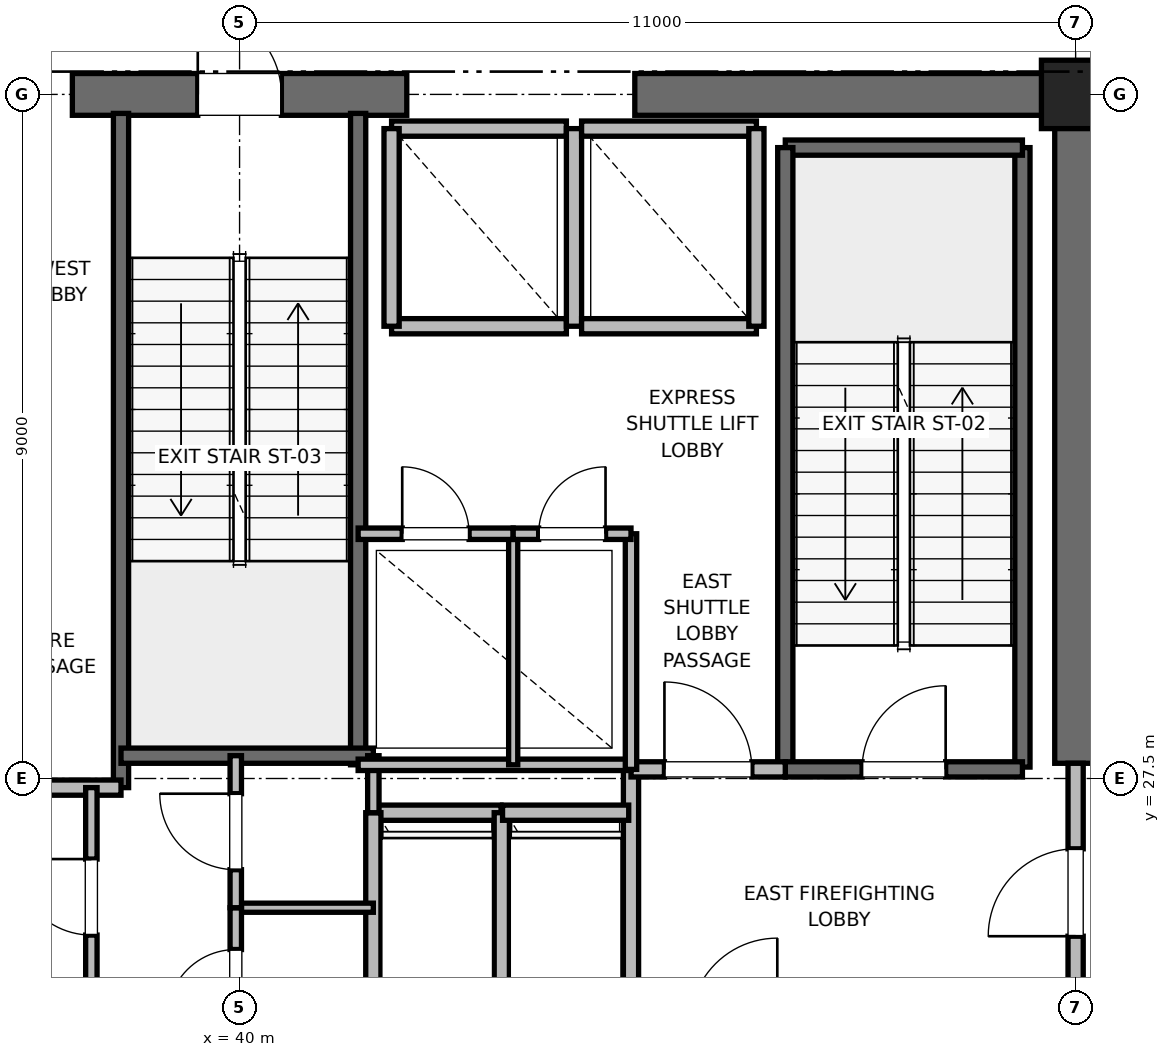
"""IFC4 building model, lengths in metres.
Left out: names, types, materials, properties, quantities, classifications, styles, units other than length and angle.
Written with IfcOpenShell. Run it as: python <this file> out.ifc"""

import sys

from ifc_helpers import new_model, si_unit, direction, frame, frame_2d, origin, origin_2d, place, context, subcontext, project, spatial, rectangle, extrude, element, fill, save


model = new_model("IFC4")
c1 = context("Model", 3, precision=1e-05, world=origin(), true_north=direction((0.0, 1.0)))
c2 = subcontext(c1, "Body", "Model", "MODEL_VIEW")
j1 = project(units=[si_unit("LENGTHUNIT", "METRE"), si_unit("PLANEANGLEUNIT", "RADIAN")], contexts=[c1])
p1 = place(None, origin())
s1 = spatial("IfcSite", under=j1, at=p1, CompositionType="ELEMENT")
p2 = place(p1, origin())
s2 = spatial("IfcBuilding", under=s1, at=p2, CompositionType="ELEMENT")
p3 = place(p2, frame((0.0, 0.0, 184.4)))
s3 = spatial("IfcBuildingStorey", under=s2, at=p3, CompositionType="ELEMENT", Elevation=184.4)
p4 = place(p3, frame((51.0, 36.5, 0.0), z_axis=(0.0, 0.0, 1.0), x_axis=(1.0, 0.0, 0.0)))
e1 = element("IfcColumn", 1, at=p4, inside=s3, PredefinedType="PILASTER", context=c2, shape_type="SweptSolid", body=[
    extrude(rectangle(XDim=0.9, YDim=0.9, at=origin_2d()), origin(), (0.0, 0.0, 1.0), 5.0),
])
p5 = place(p3, frame((37.8, 36.5, 0.0), z_axis=(0.0, 0.0, 1.0), x_axis=(1.0, 0.0, 0.0)))
e2 = element("IfcWall", 2, at=p5, inside=s3, PredefinedType="SHEAR", context=c2, shape_type="SweptSolid", body=[
    extrude(rectangle(XDim=4.4, YDim=0.55, at=frame_2d((2.2, 0.0))), origin(), (0.0, 0.0, 1.0), 4.7),
])
p6 = place(p5, frame((1.65, 0.0, 0.0)))
e3 = element("IfcOpeningElement", 3, at=p6, cuts=e2, PredefinedType="OPENING", context=c2, shape_type="SweptSolid", body=[
    extrude(rectangle(XDim=1.1, YDim=2.15, at=frame_2d((0.55, 1.075))), frame((0.0, 0.275, 0.0), z_axis=(0.0, -1.0, 0.0), x_axis=(1.0, 0.0, 0.0)), (0.0, 0.0, 1.0), 0.55),
])
p7 = place(p3, frame((45.2, 36.5, 0.0), z_axis=(0.0, 0.0, 1.0), x_axis=(1.0, 0.0, 0.0)))
e4 = element("IfcWall", 4, at=p7, inside=s3, PredefinedType="SHEAR", context=c2, shape_type="SweptSolid", body=[
    extrude(rectangle(XDim=5.8, YDim=0.55, at=frame_2d((2.9, 0.0))), origin(), (0.0, 0.0, 1.0), 4.7),
])
p8 = place(p3, frame((51.0, 27.7, 0.0), z_axis=(0.0, 0.0, 1.0), x_axis=(0.0, 1.0, 0.0)))
e5 = element("IfcWall", 5, at=p8, inside=s3, PredefinedType="SHEAR", context=c2, shape_type="SweptSolid", body=[
    extrude(rectangle(XDim=8.8, YDim=0.55, at=frame_2d((4.4, 0.0))), origin(), (0.0, 0.0, 1.0), 4.7),
])
p9 = place(p3, frame((50.3, 27.65, 0.0), z_axis=(0.0, 0.0, 1.0), x_axis=(0.0, 1.0, 0.0)))
e6 = element("IfcWall", 6, at=p9, inside=s3, PredefinedType="SOLIDWALL", context=c2, shape_type="SweptSolid", body=[
    extrude(rectangle(XDim=8.15, YDim=0.2, at=frame_2d((4.075, 0.0))), origin(), (0.0, 0.0, 1.0), 4.7),
])
p10 = place(p3, frame((47.18, 35.8, 0.0), z_axis=(0.0, 0.0, 1.0), x_axis=(1.0, 0.0, 0.0)))
e7 = element("IfcWall", 7, at=p10, inside=s3, PredefinedType="SOLIDWALL", context=c2, shape_type="SweptSolid", body=[
    extrude(rectangle(XDim=3.12, YDim=0.2, at=frame_2d((1.56, 0.0))), origin(), (0.0, 0.0, 1.0), 4.7),
])
p11 = place(p3, frame((47.18, 27.62, 0.0), z_axis=(0.0, 0.0, 1.0), x_axis=(0.0, 1.0, 0.0)))
e8 = element("IfcWall", 8, at=p11, inside=s3, PredefinedType="SOLIDWALL", context=c2, shape_type="SweptSolid", body=[
    extrude(rectangle(XDim=8.18, YDim=0.2, at=frame_2d((4.09, 0.0))), origin(), (0.0, 0.0, 1.0), 4.7),
])
p12 = place(p3, frame((47.18, 27.62, 0.0), z_axis=(0.0, 0.0, 1.0), x_axis=(1.0, 0.0, 0.0)))
e9 = element("IfcWall", 9, at=p12, inside=s3, PredefinedType="SOLIDWALL", context=c2, shape_type="SweptSolid", body=[
    extrude(rectangle(XDim=3.12, YDim=0.2, at=frame_2d((1.56, 0.0))), origin(), (0.0, 0.0, 1.0), 4.7),
])
p13 = place(p12, frame((1.01, 0.0, 0.0)))
e10 = element("IfcOpeningElement", 10, at=p13, cuts=e9, PredefinedType="OPENING", context=c2, shape_type="SweptSolid", body=[
    extrude(rectangle(XDim=1.1, YDim=2.15, at=frame_2d((0.55, 1.075))), frame((0.0, 0.1, 0.0), z_axis=(0.0, -1.0, 0.0), x_axis=(1.0, 0.0, 0.0)), (0.0, 0.0, 1.0), 0.2),
])
p14 = place(p3, frame((38.44, 27.38, 0.0), z_axis=(0.0, 0.0, 1.0), x_axis=(0.0, 1.0, 0.0)))
e11 = element("IfcWall", 11, at=p14, inside=s3, PredefinedType="SOLIDWALL", context=c2, shape_type="SweptSolid", body=[
    extrude(rectangle(XDim=8.87, YDim=0.2, at=frame_2d((4.435, 0.0))), origin(), (0.0, 0.0, 1.0), 4.7),
])
p15 = place(p3, frame((41.56, 27.68, 0.0), z_axis=(0.0, 0.0, 1.0), x_axis=(0.0, 1.0, 0.0)))
e12 = element("IfcWall", 12, at=p15, inside=s3, PredefinedType="SOLIDWALL", context=c2, shape_type="SweptSolid", body=[
    extrude(rectangle(XDim=8.57, YDim=0.2, at=frame_2d((4.285, 0.0))), origin(), (0.0, 0.0, 1.0), 4.7),
])
p16 = place(p3, frame((38.44, 27.8, 0.0), z_axis=(0.0, 0.0, 1.0), x_axis=(1.0, 0.0, 0.0)))
e13 = element("IfcWall", 13, at=p16, inside=s3, PredefinedType="SOLIDWALL", context=c2, shape_type="SweptSolid", body=[
    extrude(rectangle(XDim=3.32, YDim=0.2, at=frame_2d((1.66, 0.0))), origin(), (0.0, 0.0, 1.0), 4.7),
])
p17 = place(p3, frame((32.82, 27.38, 0.0), z_axis=(0.0, 0.0, 1.0), x_axis=(1.0, 0.0, 0.0)))
e14 = element("IfcWall", 14, at=p17, inside=s3, PredefinedType="PARTITIONING", context=c2, shape_type="SweptSolid", body=[
    extrude(rectangle(XDim=5.62, YDim=0.2, at=frame_2d((2.81, 0.0))), origin(), (0.0, 0.0, 1.0), 4.7),
])
p18 = place(p3, frame((45.15, 24.25, 0.0), z_axis=(0.0, 0.0, 1.0), x_axis=(0.0, 1.0, 0.0)))
e15 = element("IfcWall", 15, at=p18, inside=s3, PredefinedType="PARTITIONING", context=c2, shape_type="SweptSolid", body=[
    extrude(rectangle(XDim=3.37, YDim=0.2, at=frame_2d((1.685, 0.0))), origin(), (0.0, 0.0, 1.0), 4.7),
])
p19 = place(p3, frame((45.15, 27.62, 0.0), z_axis=(0.0, 0.0, 1.0), x_axis=(1.0, 0.0, 0.0)))
e16 = element("IfcWall", 16, at=p19, inside=s3, PredefinedType="PARTITIONING", context=c2, shape_type="SweptSolid", body=[
    extrude(rectangle(XDim=2.03, YDim=0.2, at=frame_2d((1.015, 0.0))), origin(), (0.0, 0.0, 1.0), 4.7),
])
p20 = place(p19, frame((0.44, 0.0, 0.0)))
e17 = element("IfcOpeningElement", 17, at=p20, cuts=e16, PredefinedType="OPENING", context=c2, shape_type="SweptSolid", body=[
    extrude(rectangle(XDim=1.15, YDim=2.2, at=frame_2d((0.575, 1.1))), frame((0.0, 0.1, 0.0), z_axis=(0.0, -1.0, 0.0), x_axis=(1.0, 0.0, 0.0)), (0.0, 0.0, 1.0), 0.2),
])
p21 = place(p3, frame((51.0, 24.3, 0.0), z_axis=(0.0, 0.0, 1.0), x_axis=(0.0, 1.0, 0.0)))
e18 = element("IfcWall", 18, at=p21, inside=s3, PredefinedType="PARTITIONING", context=c2, shape_type="SweptSolid", body=[
    extrude(rectangle(XDim=3.4, YDim=0.2, at=frame_2d((1.7, 0.0))), origin(), (0.0, 0.0, 1.0), 3.68),
])
p22 = place(p21, frame((1.125, 0.0, 0.0)))
e19 = element("IfcOpeningElement", 19, at=p22, cuts=e18, PredefinedType="OPENING", context=c2, shape_type="SweptSolid", body=[
    extrude(rectangle(XDim=1.15, YDim=2.2, at=frame_2d((0.575, 1.1))), frame((0.0, 0.1, 0.0), z_axis=(0.0, -1.0, 0.0), x_axis=(1.0, 0.0, 0.0)), (0.0, 0.0, 1.0), 0.2),
])
p23 = place(p3, frame((43.44, 27.05, 0.0), z_axis=(0.0, 0.0, 1.0), x_axis=(-1.0, 0.0, 0.0)))
e20 = element("IfcWall", 20, at=p23, inside=s3, PredefinedType="SOLIDWALL", context=c2, shape_type="SweptSolid", body=[
    extrude(rectangle(XDim=1.68, YDim=0.2, at=frame_2d((0.84, 0.0))), origin(), (0.0, 0.0, 1.0), 4.7),
])
for number, where, z_axis, x_axis in (
    (21, (41.76, 27.05, 0.0), (0.0, 0.0, 1.0), (0.0, -1.0, 0.0)),
    (22, (43.45, 24.45, 0.0), (0.0, 0.0, 1.0), (0.0, 1.0, 0.0)),
):
    element("IfcWall", number, at=place(p3, frame(where, z_axis=z_axis, x_axis=x_axis)), inside=s3, PredefinedType="SOLIDWALL", context=c2, shape_type="SweptSolid", body=[
        extrude(rectangle(XDim=2.6, YDim=0.2, at=frame_2d((1.3, 0.0))), origin(), (0.0, 0.0, 1.0), 4.7),
    ])
p24 = place(p3, frame((45.12, 27.05, 0.0), z_axis=(0.0, 0.0, 1.0), x_axis=(-1.0, 0.0, 0.0)))
e23 = element("IfcWall", 23, at=p24, inside=s3, PredefinedType="SOLIDWALL", context=c2, shape_type="SweptSolid", body=[
    extrude(rectangle(XDim=1.66, YDim=0.2, at=frame_2d((0.83, 0.0))), origin(), (0.0, 0.0, 1.0), 4.7),
])
p25 = place(p3, frame((42.0, 33.45, 0.0), z_axis=(0.0, 0.0, 1.0), x_axis=(1.0, 0.0, 0.0)))
e24 = element("IfcWall", 24, at=p25, inside=s3, PredefinedType="SOLIDWALL", context=c2, shape_type="SweptSolid", body=[
    extrude(rectangle(XDim=2.3, YDim=0.2, at=frame_2d((1.15, 0.0))), origin(), (0.0, 0.0, 1.0), 4.7),
])
p26 = place(p3, frame((44.3, 36.05, 0.0), z_axis=(0.0, 0.0, 1.0), x_axis=(-1.0, 0.0, 0.0)))
e25 = element("IfcWall", 25, at=p26, inside=s3, PredefinedType="SOLIDWALL", context=c2, shape_type="SweptSolid", body=[
    extrude(rectangle(XDim=2.3, YDim=0.2, at=frame_2d((1.15, 0.0))), origin(), (0.0, 0.0, 1.0), 3.68),
])
for number, where, z_axis, x_axis in (
    (26, (42.0, 36.05, 0.0), (0.0, 0.0, 1.0), (0.0, -1.0, 0.0)),
    (27, (44.4, 33.45, 0.0), (0.0, 0.0, 1.0), (0.0, 1.0, 0.0)),
):
    element("IfcWall", number, at=place(p3, frame(where, z_axis=z_axis, x_axis=x_axis)), inside=s3, PredefinedType="SOLIDWALL", context=c2, shape_type="SweptSolid", body=[
        extrude(rectangle(XDim=2.6, YDim=0.2, at=frame_2d((1.3, 0.0))), origin(), (0.0, 0.0, 1.0), 3.68),
    ])
p27 = place(p3, frame((44.5, 33.45, 0.0), z_axis=(0.0, 0.0, 1.0), x_axis=(1.0, 0.0, 0.0)))
e28 = element("IfcWall", 28, at=p27, inside=s3, PredefinedType="SOLIDWALL", context=c2, shape_type="SweptSolid", body=[
    extrude(rectangle(XDim=2.3, YDim=0.2, at=frame_2d((1.15, 0.0))), origin(), (0.0, 0.0, 1.0), 4.7),
])
p28 = place(p3, frame((46.8, 36.05, 0.0), z_axis=(0.0, 0.0, 1.0), x_axis=(-1.0, 0.0, 0.0)))
e29 = element("IfcWall", 29, at=p28, inside=s3, PredefinedType="SOLIDWALL", context=c2, shape_type="SweptSolid", body=[
    extrude(rectangle(XDim=2.3, YDim=0.2, at=frame_2d((1.15, 0.0))), origin(), (0.0, 0.0, 1.0), 3.68),
])
p29 = place(p3, frame((46.8, 33.45, 0.0), z_axis=(0.0, 0.0, 1.0), x_axis=(0.0, 1.0, 0.0)))
e30 = element("IfcWall", 30, at=p29, inside=s3, PredefinedType="SOLIDWALL", context=c2, shape_type="SweptSolid", body=[
    extrude(rectangle(XDim=2.6, YDim=0.2, at=frame_2d((1.3, 0.0))), origin(), (0.0, 0.0, 1.0), 4.7),
])
p30 = place(p3, frame((39.95, 25.8, 0.0), z_axis=(0.0, 0.0, 1.0), x_axis=(1.0, 0.0, 0.0)))
e31 = element("IfcWall", 31, at=p30, inside=s3, PredefinedType="PARTITIONING", context=c2, shape_type="SweptSolid", body=[
    extrude(rectangle(XDim=1.81, YDim=0.12, at=frame_2d((0.905, 0.0))), origin(), (0.0, 0.0, 1.0), 2.85),
])
p31 = place(p3, frame((41.76, 27.05, 0.0), z_axis=(0.0, 0.0, 1.0), x_axis=(0.0, 1.0, 0.0)))
e32 = element("IfcWall", 32, at=p31, inside=s3, PredefinedType="PARTITIONING", context=c2, shape_type="SweptSolid", body=[
    extrude(rectangle(XDim=0.75, YDim=0.15, at=frame_2d((0.375, 0.0))), origin(), (0.0, 0.0, 1.0), 2.85),
])
p32 = place(p3, frame((39.95, 23.8, 0.0), z_axis=(0.0, 0.0, 1.0), x_axis=(0.0, 1.0, 0.0)))
e33 = element("IfcWall", 33, at=p32, inside=s3, PredefinedType="PARTITIONING", context=c2, shape_type="SweptSolid", body=[
    extrude(rectangle(XDim=2.0, YDim=0.15, at=frame_2d((1.0, 0.0))), origin(), (0.0, 0.0, 1.0), 2.85),
])
p33 = place(p32, frame((0.55, 0.0, 0.0)))
e34 = element("IfcOpeningElement", 34, at=p33, cuts=e33, PredefinedType="OPENING", context=c2, shape_type="SweptSolid", body=[
    extrude(rectangle(XDim=0.9, YDim=2.1, at=frame_2d((0.45, 1.05))), frame((0.0, 0.075, 0.0), z_axis=(0.0, -1.0, 0.0), x_axis=(1.0, 0.0, 0.0)), (0.0, 0.0, 1.0), 0.15),
])
p34 = place(p3, frame((39.95, 25.8, 0.0), z_axis=(0.0, 0.0, 1.0), x_axis=(0.0, 1.0, 0.0)))
e35 = element("IfcWall", 35, at=p34, inside=s3, PredefinedType="PARTITIONING", context=c2, shape_type="SweptSolid", body=[
    extrude(rectangle(XDim=2.0, YDim=0.15, at=frame_2d((1.0, 0.0))), origin(), (0.0, 0.0, 1.0), 2.85),
])
p35 = place(p34, frame((0.5, 0.0, 0.0)))
e36 = element("IfcOpeningElement", 36, at=p35, cuts=e35, PredefinedType="OPENING", context=c2, shape_type="SweptSolid", body=[
    extrude(rectangle(XDim=1.0, YDim=2.15, at=frame_2d((0.5, 1.075))), frame((0.0, 0.075, 0.0), z_axis=(0.0, -1.0, 0.0), x_axis=(1.0, 0.0, 0.0)), (0.0, 0.0, 1.0), 0.15),
])
p36 = place(p3, frame((38.05, 24.5, 0.0), z_axis=(0.0, 0.0, 1.0), x_axis=(0.0, 1.0, 0.0)))
e37 = element("IfcWall", 37, at=p36, inside=s3, PredefinedType="PARTITIONING", context=c2, shape_type="SweptSolid", body=[
    extrude(rectangle(XDim=2.88, YDim=0.15, at=frame_2d((1.44, 0.0))), origin(), (0.0, 0.0, 1.0), 2.85),
])
p37 = place(p36, frame((0.94, 0.0, 0.0)))
e38 = element("IfcOpeningElement", 38, at=p37, cuts=e37, PredefinedType="OPENING", context=c2, shape_type="SweptSolid", body=[
    extrude(rectangle(XDim=1.0, YDim=2.15, at=frame_2d((0.5, 1.075))), frame((0.0, 0.075, 0.0), z_axis=(0.0, -1.0, 0.0), x_axis=(1.0, 0.0, 0.0)), (0.0, 0.0, 1.0), 0.15),
])
p38 = place(p3, frame((41.56, 27.68, 0.0), z_axis=(0.0, 0.0, 1.0), x_axis=(1.0, 0.0, 0.0)))
e39 = element("IfcWall", 39, at=p38, inside=s3, PredefinedType="PARTITIONING", context=c2, shape_type="SweptSolid", body=[
    extrude(rectangle(XDim=3.59, YDim=0.15, at=frame_2d((1.795, 0.0))), origin(), (0.0, 0.0, 1.0), 2.85),
])
p39 = place(p3, frame((45.15, 27.62, 0.0), z_axis=(0.0, 0.0, 1.0), x_axis=(0.0, 1.0, 0.0)))
e40 = element("IfcWall", 40, at=p39, inside=s3, PredefinedType="PARTITIONING", context=c2, shape_type="SweptSolid", body=[
    extrude(rectangle(XDim=3.1, YDim=0.15, at=frame_2d((1.55, 0.0))), origin(), (0.0, 0.0, 1.0), 2.85),
])
p40 = place(p3, frame((43.6, 27.68, 0.0), z_axis=(0.0, 0.0, 1.0), x_axis=(0.0, 1.0, 0.0)))
e41 = element("IfcWall", 41, at=p40, inside=s3, PredefinedType="PARTITIONING", context=c2, shape_type="SweptSolid", body=[
    extrude(rectangle(XDim=3.04, YDim=0.12, at=frame_2d((1.52, 0.0))), origin(), (0.0, 0.0, 1.0), 2.85),
])
p41 = place(p3, frame((41.56, 30.72, 0.0), z_axis=(0.0, 0.0, 1.0), x_axis=(1.0, 0.0, 0.0)))
e42 = element("IfcWall", 42, at=p41, inside=s3, PredefinedType="PARTITIONING", context=c2, shape_type="SweptSolid", body=[
    extrude(rectangle(XDim=2.04, YDim=0.15, at=frame_2d((1.02, 0.0))), origin(), (0.0, 0.0, 1.0), 2.85),
])
p42 = place(p41, frame((0.58, 0.0, 0.0)))
e43 = element("IfcOpeningElement", 43, at=p42, cuts=e42, PredefinedType="OPENING", context=c2, shape_type="SweptSolid", body=[
    extrude(rectangle(XDim=0.88, YDim=2.1, at=frame_2d((0.44, 1.05))), frame((0.0, 0.075, 0.0), z_axis=(0.0, -1.0, 0.0), x_axis=(1.0, 0.0, 0.0)), (0.0, 0.0, 1.0), 0.15),
])
p43 = place(p3, frame((43.6, 30.72, 0.0), z_axis=(0.0, 0.0, 1.0), x_axis=(1.0, 0.0, 0.0)))
e44 = element("IfcWall", 44, at=p43, inside=s3, PredefinedType="PARTITIONING", context=c2, shape_type="SweptSolid", body=[
    extrude(rectangle(XDim=1.55, YDim=0.15, at=frame_2d((0.775, 0.0))), origin(), (0.0, 0.0, 1.0), 2.85),
])
p44 = place(p43, frame((0.335, 0.0, 0.0)))
e45 = element("IfcOpeningElement", 45, at=p44, cuts=e44, PredefinedType="OPENING", context=c2, shape_type="SweptSolid", body=[
    extrude(rectangle(XDim=0.88, YDim=2.1, at=frame_2d((0.44, 1.05))), frame((0.0, 0.075, 0.0), z_axis=(0.0, -1.0, 0.0), x_axis=(1.0, 0.0, 0.0)), (0.0, 0.0, 1.0), 0.15),
])
p45 = place(p13, origin())
e46 = element("IfcDoor", 46, at=p45, inside=s3, OperationType="SINGLE_SWING_RIGHT", PredefinedType="DOOR", context=c2, shape_type="SweptSolid", body=[
    extrude(rectangle(XDim=1.1, YDim=2.15, at=frame_2d((0.55, 1.075))), frame((0.0, 0.025, 0.0), z_axis=(0.0, -1.0, 0.0), x_axis=(1.0, 0.0, 0.0)), (0.0, 0.0, 1.0), 0.05),
])
fill(e10, e46)
p46 = place(p6, origin())
e47 = element("IfcDoor", 47, at=p46, inside=s3, OperationType="SINGLE_SWING_LEFT", PredefinedType="DOOR", context=c2, shape_type="SweptSolid", body=[
    extrude(rectangle(XDim=1.1, YDim=2.15, at=frame_2d((0.55, 1.075))), frame((0.0, 0.025, 0.0), z_axis=(0.0, -1.0, 0.0), x_axis=(1.0, 0.0, 0.0)), (0.0, 0.0, 1.0), 0.05),
])
fill(e3, e47)
p47 = place(p20, origin())
e48 = element("IfcDoor", 48, at=p47, inside=s3, OperationType="SINGLE_SWING_LEFT", PredefinedType="DOOR", context=c2, shape_type="SweptSolid", body=[
    extrude(rectangle(XDim=1.15, YDim=2.2, at=frame_2d((0.575, 1.1))), frame((0.0, 0.025, 0.0), z_axis=(0.0, -1.0, 0.0), x_axis=(1.0, 0.0, 0.0)), (0.0, 0.0, 1.0), 0.05),
])
fill(e17, e48)
p48 = place(p22, origin())
e49 = element("IfcDoor", 49, at=p48, inside=s3, OperationType="SINGLE_SWING_LEFT", PredefinedType="DOOR", context=c2, shape_type="SweptSolid", body=[
    extrude(rectangle(XDim=1.15, YDim=2.2, at=frame_2d((0.575, 1.1))), frame((0.0, 0.025, 0.0), z_axis=(0.0, -1.0, 0.0), x_axis=(1.0, 0.0, 0.0)), (0.0, 0.0, 1.0), 0.05),
])
fill(e19, e49)
p49 = place(p33, origin())
e50 = element("IfcDoor", 50, at=p49, inside=s3, OperationType="SINGLE_SWING_LEFT", PredefinedType="DOOR", context=c2, shape_type="SweptSolid", body=[
    extrude(rectangle(XDim=0.9, YDim=2.1, at=frame_2d((0.45, 1.05))), frame((0.0, 0.025, 0.0), z_axis=(0.0, -1.0, 0.0), x_axis=(1.0, 0.0, 0.0)), (0.0, 0.0, 1.0), 0.05),
])
fill(e34, e50)
p50 = place(p35, origin())
e51 = element("IfcDoor", 51, at=p50, inside=s3, OperationType="SINGLE_SWING_RIGHT", PredefinedType="DOOR", context=c2, shape_type="SweptSolid", body=[
    extrude(rectangle(XDim=1.0, YDim=2.15, at=frame_2d((0.5, 1.075))), frame((0.0, 0.025, 0.0), z_axis=(0.0, -1.0, 0.0), x_axis=(1.0, 0.0, 0.0)), (0.0, 0.0, 1.0), 0.05),
])
fill(e36, e51)
p51 = place(p37, origin())
e52 = element("IfcDoor", 52, at=p51, inside=s3, OperationType="SINGLE_SWING_RIGHT", PredefinedType="DOOR", context=c2, shape_type="SweptSolid", body=[
    extrude(rectangle(XDim=1.0, YDim=2.15, at=frame_2d((0.5, 1.075))), frame((0.0, 0.025, 0.0), z_axis=(0.0, -1.0, 0.0), x_axis=(1.0, 0.0, 0.0)), (0.0, 0.0, 1.0), 0.05),
])
fill(e38, e52)
p52 = place(p42, origin())
e53 = element("IfcDoor", 53, at=p52, inside=s3, OperationType="SINGLE_SWING_LEFT", PredefinedType="DOOR", context=c2, shape_type="SweptSolid", body=[
    extrude(rectangle(XDim=0.88, YDim=2.1, at=frame_2d((0.44, 1.05))), frame((0.0, 0.025, 0.0), z_axis=(0.0, -1.0, 0.0), x_axis=(1.0, 0.0, 0.0)), (0.0, 0.0, 1.0), 0.05),
])
fill(e43, e53)
p53 = place(p44, origin())
e54 = element("IfcDoor", 54, at=p53, inside=s3, OperationType="SINGLE_SWING_RIGHT", PredefinedType="DOOR", context=c2, shape_type="SweptSolid", body=[
    extrude(rectangle(XDim=0.88, YDim=2.1, at=frame_2d((0.44, 1.05))), frame((0.0, 0.025, 0.0), z_axis=(0.0, -1.0, 0.0), x_axis=(1.0, 0.0, 0.0)), (0.0, 0.0, 1.0), 0.05),
])
fill(e45, e54)
save(model, sys.argv[1])
